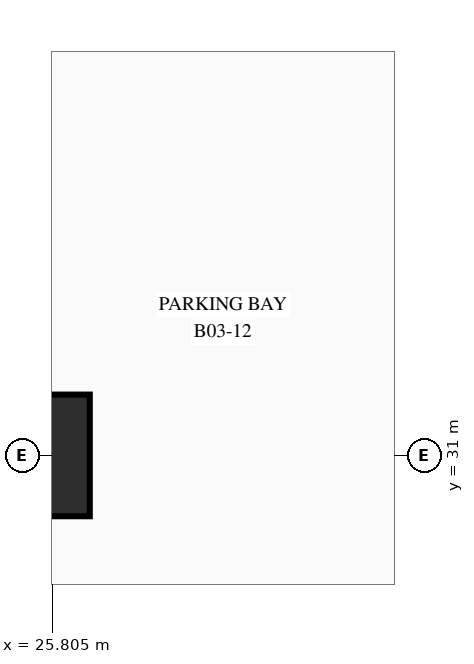
"""IFC4 building model, lengths in metres.
Left out: names, types, materials, properties, quantities, classifications, styles, units other than length and angle.
Written with IfcOpenShell. Run it as: python <this file> out.ifc"""

import sys

from ifc_helpers import new_model, si_unit, direction, frame, origin, origin_2d, place, context, subcontext, project, spatial, rectangle, extrude, element, save


model = new_model("IFC4")
c1 = context("Model", 3, precision=1e-05, world=origin(), true_north=direction((0.0, 1.0)))
c2 = subcontext(c1, "Body", "Model", "MODEL_VIEW")
j1 = project(units=[si_unit("LENGTHUNIT", "METRE"), si_unit("PLANEANGLEUNIT", "RADIAN")], contexts=[c1])
p1 = place(None, origin())
s1 = spatial("IfcSite", under=j1, at=p1, CompositionType="ELEMENT")
p2 = place(p1, origin())
s2 = spatial("IfcBuilding", under=s1, at=p2, CompositionType="ELEMENT")
p3 = place(p2, frame((0.0, 0.0, -13.5)))
s3 = spatial("IfcBuildingStorey", under=s2, at=p3, CompositionType="ELEMENT", Elevation=-13.5)
p4 = place(p3, frame((25.5, 31.0, 0.0), z_axis=(0.0, 0.0, 1.0), x_axis=(1.0, 0.0, 0.0)))
e1 = element("IfcColumn", 1, at=p4, inside=s3, PredefinedType="COLUMN", context=c2, shape_type="SweptSolid", body=[
    extrude(rectangle(XDim=1.6, YDim=1.6, at=origin_2d()), origin(), (0.0, 0.0, 1.0), 4.5),
])
save(model, sys.argv[1])
